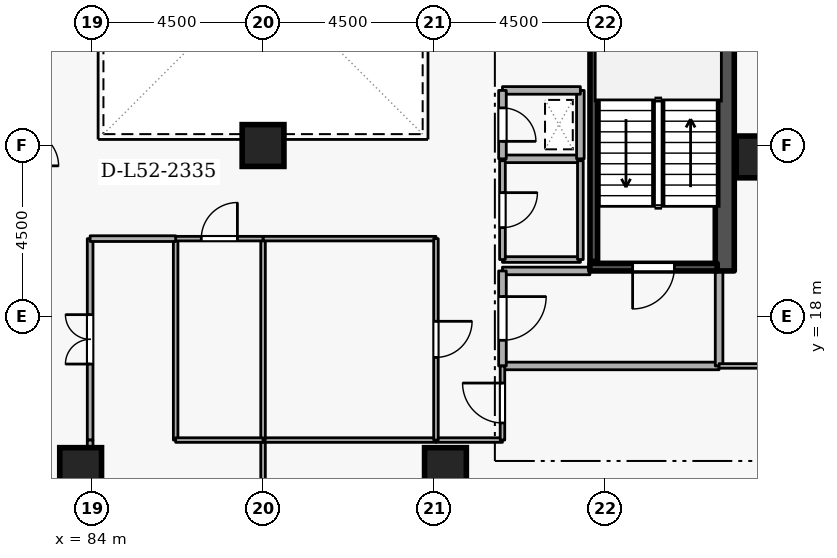
"""IFC4 building model, lengths in metres.
Left out: names, types, materials, properties, quantities, classifications, styles, units other than length and angle.
Written with IfcOpenShell. Run it as: python <this file> out.ifc"""

import sys

from ifc_helpers import new_model, si_unit, direction, frame, frame_2d, origin, origin_2d, place, context, subcontext, project, spatial, rectangle, extrude, element, fill, save


model = new_model("IFC4")
c1 = context("Model", 3, precision=1e-05, world=origin(), true_north=direction((0.0, 1.0)))
c2 = subcontext(c1, "Body", "Model", "MODEL_VIEW")
j1 = project(units=[si_unit("LENGTHUNIT", "METRE"), si_unit("PLANEANGLEUNIT", "RADIAN")], contexts=[c1])
p1 = place(None, origin())
s1 = spatial("IfcSite", under=j1, at=p1, CompositionType="ELEMENT")
p2 = place(p1, origin())
s2 = spatial("IfcBuilding", under=s1, at=p2, CompositionType="ELEMENT")
p3 = place(p2, frame((0.0, 0.0, 196.5)))
s3 = spatial("IfcBuildingStorey", under=s2, at=p3, CompositionType="ELEMENT", Elevation=196.5)
p4 = place(p3, frame((100.65, 19.2, 0.0), z_axis=(0.0, 0.0, 1.0), x_axis=(0.0, 1.0, 0.0)))
e1 = element("IfcWall", 1, at=p4, inside=s3, PredefinedType="SHEAR", context=c2, shape_type="SweptSolid", body=[
    extrude(rectangle(XDim=15.6, YDim=0.5, at=frame_2d((7.8, 0.0))), origin(), (0.0, 0.0, 1.0), 3.6),
])
for number, where, z_axis, x_axis in (
    (2, (93.3, 14.0, 0.0), (0.0, 0.0, 1.0), (1.0, 0.0, 0.0)),
    (3, (83.7, 14.0, 0.0), (0.0, 0.0, 1.0), (1.0, 0.0, 0.0)),
    (4, (101.5, 22.2, 0.0), (0.0, 0.0, 1.0), (1.0, 0.0, 0.0)),
    (5, (88.5, 22.5, 0.0), (0.0, 0.0, 1.0), (1.0, 0.0, 0.0)),
):
    element("IfcColumn", number, at=place(p3, frame(where, z_axis=z_axis, x_axis=x_axis)), inside=s3, PredefinedType="COLUMN", context=c2, shape_type="SweptSolid", body=[
        extrude(rectangle(XDim=1.1, YDim=1.1, at=origin_2d()), origin(), (0.0, 0.0, 1.0), 3.6),
    ])
p5 = place(p3, frame((100.45, 19.3, 0.0), z_axis=(0.0, 0.0, 1.0), x_axis=(-1.0, 0.0, 0.0)))
e6 = element("IfcWall", 6, at=p5, inside=s3, PredefinedType="SHEAR", context=c2, shape_type="SweptSolid", body=[
    extrude(rectangle(XDim=3.35, YDim=0.2, at=frame_2d((1.675, 0.0))), origin(), (0.0, 0.0, 1.0), 3.6),
])
p6 = place(p5, frame((1.125, 0.0, 0.0)))
e7 = element("IfcOpeningElement", 7, at=p6, cuts=e6, PredefinedType="OPENING", context=c2, shape_type="SweptSolid", body=[
    extrude(rectangle(XDim=1.1, YDim=2.1, at=frame_2d((0.55, 1.05))), frame((0.0, 0.11, 0.0), z_axis=(0.0, -1.0, 0.0), x_axis=(1.0, 0.0, 0.0)), (0.0, 0.0, 1.0), 0.22),
])
p7 = place(p3, frame((97.203, 26.55, 0.0), z_axis=(0.0, 0.0, 1.0), x_axis=(0.0, -1.0, 0.0)))
e8 = element("IfcWall", 8, at=p7, inside=s3, PredefinedType="SHEAR", context=c2, shape_type="SweptSolid", body=[
    extrude(rectangle(XDim=7.1, YDim=0.2, at=frame_2d((3.55, 0.0))), origin(), (0.0, 0.0, 1.0), 3.6),
])
p8 = place(p3, frame((94.8, 16.7, 0.0), z_axis=(0.0, 0.0, 1.0), x_axis=(1.0, 0.0, 0.0)))
e9 = element("IfcWall", 9, at=p8, inside=s3, PredefinedType="STANDARD", context=c2, shape_type="SweptSolid", body=[
    extrude(rectangle(XDim=5.7, YDim=0.2, at=frame_2d((2.85, 0.0))), origin(), (0.0, 0.0, 1.0), 3.32),
])
p9 = place(p3, frame((100.5, 16.7, 0.0), z_axis=(0.0, 0.0, 1.0), x_axis=(0.0, 1.0, 0.0)))
e10 = element("IfcWall", 10, at=p9, inside=s3, PredefinedType="STANDARD", context=c2, shape_type="SweptSolid", body=[
    extrude(rectangle(XDim=2.5, YDim=0.2, at=frame_2d((1.25, 0.0))), origin(), (0.0, 0.0, 1.0), 3.32),
])
p10 = place(p3, frame((97.1, 19.2, 0.0), z_axis=(0.0, 0.0, 1.0), x_axis=(-1.0, 0.0, 0.0)))
e11 = element("IfcWall", 11, at=p10, inside=s3, PredefinedType="STANDARD", context=c2, shape_type="SweptSolid", body=[
    extrude(rectangle(XDim=2.3, YDim=0.2, at=frame_2d((1.15, 0.0))), origin(), (0.0, 0.0, 1.0), 2.525),
])
p11 = place(p3, frame((94.8, 19.2, 0.0), z_axis=(0.0, 0.0, 1.0), x_axis=(0.0, -1.0, 0.0)))
e12 = element("IfcWall", 12, at=p11, inside=s3, PredefinedType="STANDARD", context=c2, shape_type="SweptSolid", body=[
    extrude(rectangle(XDim=2.5, YDim=0.2, at=frame_2d((1.25, 0.0))), origin(), (0.0, 0.0, 1.0), 3.32),
])
p12 = place(p11, frame((0.675, 0.0, 0.0)))
e13 = element("IfcOpeningElement", 13, at=p12, cuts=e12, PredefinedType="OPENING", context=c2, shape_type="SweptSolid", body=[
    extrude(rectangle(XDim=1.15, YDim=2.1, at=frame_2d((0.575, 1.05))), frame((0.0, 0.11, 0.0), z_axis=(0.0, -1.0, 0.0), x_axis=(1.0, 0.0, 0.0)), (0.0, 0.0, 1.0), 0.22),
])
p13 = place(p3, frame((94.8, 22.15, 0.0), z_axis=(0.0, 0.0, 1.0), x_axis=(1.0, 0.0, 0.0)))
e14 = element("IfcWall", 14, at=p13, inside=s3, PredefinedType="STANDARD", context=c2, shape_type="SweptSolid", body=[
    extrude(rectangle(XDim=2.05, YDim=0.2, at=frame_2d((1.025, 0.0))), origin(), (0.0, 0.0, 1.0), 3.32),
])
p14 = place(p3, frame((96.85, 22.15, 0.0), z_axis=(0.0, 0.0, 1.0), x_axis=(0.0, 1.0, 0.0)))
e15 = element("IfcWall", 15, at=p14, inside=s3, PredefinedType="STANDARD", context=c2, shape_type="SweptSolid", body=[
    extrude(rectangle(XDim=1.8, YDim=0.2, at=frame_2d((0.9, 0.0))), origin(), (0.0, 0.0, 1.0), 3.32),
])
p15 = place(p3, frame((96.85, 23.95, 0.0), z_axis=(0.0, 0.0, 1.0), x_axis=(-1.0, 0.0, 0.0)))
e16 = element("IfcWall", 16, at=p15, inside=s3, PredefinedType="STANDARD", context=c2, shape_type="SweptSolid", body=[
    extrude(rectangle(XDim=2.05, YDim=0.2, at=frame_2d((1.025, 0.0))), origin(), (0.0, 0.0, 1.0), 3.32),
])
p16 = place(p3, frame((94.8, 23.95, 0.0), z_axis=(0.0, 0.0, 1.0), x_axis=(0.0, -1.0, 0.0)))
e17 = element("IfcWall", 17, at=p16, inside=s3, PredefinedType="STANDARD", context=c2, shape_type="SweptSolid", body=[
    extrude(rectangle(XDim=1.8, YDim=0.2, at=frame_2d((0.9, 0.0))), origin(), (0.0, 0.0, 1.0), 3.32),
])
p17 = place(p16, frame((0.46, 0.0, 0.0)))
e18 = element("IfcOpeningElement", 18, at=p17, cuts=e17, PredefinedType="OPENING", context=c2, shape_type="SweptSolid", body=[
    extrude(rectangle(XDim=0.88, YDim=2.04, at=frame_2d((0.44, 1.02))), frame((0.0, 0.11, 0.0), z_axis=(0.0, -1.0, 0.0), x_axis=(1.0, 0.0, 0.0)), (0.0, 0.0, 1.0), 0.22),
])
p18 = place(p3, frame((94.8, 19.5, 0.0), z_axis=(0.0, 0.0, 1.0), x_axis=(1.0, 0.0, 0.0)))
e19 = element("IfcWall", 19, at=p18, inside=s3, PredefinedType="PARTITIONING", context=c2, shape_type="SweptSolid", body=[
    extrude(rectangle(XDim=2.05, YDim=0.15, at=frame_2d((1.025, 0.0))), origin(), (0.0, 0.0, 1.0), 2.525),
])
p19 = place(p3, frame((96.85, 19.5, 0.0), z_axis=(0.0, 0.0, 1.0), x_axis=(0.0, 1.0, 0.0)))
e20 = element("IfcWall", 20, at=p19, inside=s3, PredefinedType="PARTITIONING", context=c2, shape_type="SweptSolid", body=[
    extrude(rectangle(XDim=2.6, YDim=0.15, at=frame_2d((1.3, 0.0))), origin(), (0.0, 0.0, 1.0), 3.32),
])
p20 = place(p3, frame((94.8, 22.1, 0.0), z_axis=(0.0, 0.0, 1.0), x_axis=(0.0, -1.0, 0.0)))
e21 = element("IfcWall", 21, at=p20, inside=s3, PredefinedType="PARTITIONING", context=c2, shape_type="SweptSolid", body=[
    extrude(rectangle(XDim=2.6, YDim=0.15, at=frame_2d((1.3, 0.0))), origin(), (0.0, 0.0, 1.0), 3.32),
])
p21 = place(p20, frame((0.84, 0.0, 0.0)))
e22 = element("IfcOpeningElement", 22, at=p21, cuts=e21, PredefinedType="OPENING", context=c2, shape_type="SweptSolid", body=[
    extrude(rectangle(XDim=0.92, YDim=2.08, at=frame_2d((0.46, 1.04))), frame((0.0, 0.085, 0.0), z_axis=(0.0, -1.0, 0.0), x_axis=(1.0, 0.0, 0.0)), (0.0, 0.0, 1.0), 0.17),
])
p22 = place(p3, frame((88.5, 9.28, 0.0), z_axis=(0.0, 0.0, 1.0), x_axis=(0.0, 1.0, 0.0)))
e23 = element("IfcWall", 23, at=p22, inside=s3, PredefinedType="PARTITIONING", context=c2, shape_type="SweptSolid", body=[
    extrude(rectangle(XDim=5.47, YDim=0.12, at=frame_2d((2.735, 0.0))), origin(), (0.0, 0.0, 1.0), 1.785),
])
p23 = place(p3, frame((88.5, 14.75, 0.0), z_axis=(0.0, 0.0, 1.0), x_axis=(1.0, 0.0, 0.0)))
e24 = element("IfcWall", 24, at=p23, inside=s3, PredefinedType="PARTITIONING", context=c2, shape_type="SweptSolid", body=[
    extrude(rectangle(XDim=4.55, YDim=0.12, at=frame_2d((2.275, 0.0))), origin(), (0.0, 0.0, 1.0), 3.32),
])
p24 = place(p3, frame((93.05, 14.75, 0.0), z_axis=(0.0, 0.0, 1.0), x_axis=(1.0, 0.0, 0.0)))
e25 = element("IfcWall", 25, at=p24, inside=s3, PredefinedType="PARTITIONING", context=c2, shape_type="SweptSolid", body=[
    extrude(rectangle(XDim=1.75, YDim=0.12, at=frame_2d((0.875, 0.0))), origin(), (0.0, 0.0, 1.0), 3.32),
])
p25 = place(p3, frame((94.8, 14.75, 0.0), z_axis=(0.0, 0.0, 1.0), x_axis=(0.0, 1.0, 0.0)))
e26 = element("IfcWall", 26, at=p25, inside=s3, PredefinedType="PARTITIONING", context=c2, shape_type="SweptSolid", body=[
    extrude(rectangle(XDim=1.95, YDim=0.12, at=frame_2d((0.975, 0.0))), origin(), (0.0, 0.0, 1.0), 3.32),
])
p26 = place(p25, frame((0.45, 0.0, 0.0)))
e27 = element("IfcOpeningElement", 27, at=p26, cuts=e26, PredefinedType="OPENING", context=c2, shape_type="SweptSolid", body=[
    extrude(rectangle(XDim=1.05, YDim=2.1, at=frame_2d((0.525, 1.05))), frame((0.0, 0.07, 0.0), z_axis=(0.0, -1.0, 0.0), x_axis=(1.0, 0.0, 0.0)), (0.0, 0.0, 1.0), 0.14),
])
p27 = place(p3, frame((100.5, 16.7, 0.0), z_axis=(0.0, 0.0, 1.0), x_axis=(1.0, 0.0, 0.0)))
e28 = element("IfcWall", 28, at=p27, inside=s3, PredefinedType="PARTITIONING", context=c2, shape_type="SweptSolid", body=[
    extrude(rectangle(XDim=5.72, YDim=0.12, at=frame_2d((2.86, 0.0))), origin(), (0.0, 0.0, 1.0), 3.32),
])
p28 = place(p3, frame((88.5, 14.75, 0.0), z_axis=(0.0, 0.0, 1.0), x_axis=(0.0, 1.0, 0.0)))
e29 = element("IfcWall", 29, at=p28, inside=s3, PredefinedType="PARTITIONING", context=c2, shape_type="SweptSolid", body=[
    extrude(rectangle(XDim=5.3, YDim=0.12, at=frame_2d((2.65, 0.0))), origin(), (0.0, 0.0, 1.0), 1.785),
])
p29 = place(p3, frame((88.5, 20.05, 0.0), z_axis=(0.0, 0.0, 1.0), x_axis=(1.0, 0.0, 0.0)))
e30 = element("IfcWall", 30, at=p29, inside=s3, PredefinedType="PARTITIONING", context=c2, shape_type="SweptSolid", body=[
    extrude(rectangle(XDim=4.55, YDim=0.12, at=frame_2d((2.275, 0.0))), origin(), (0.0, 0.0, 1.0), 3.32),
])
p30 = place(p3, frame((93.05, 20.05, 0.0), z_axis=(0.0, 0.0, 1.0), x_axis=(0.0, -1.0, 0.0)))
e31 = element("IfcWall", 31, at=p30, inside=s3, PredefinedType="PARTITIONING", context=c2, shape_type="SweptSolid", body=[
    extrude(rectangle(XDim=5.3, YDim=0.12, at=frame_2d((2.65, 0.0))), origin(), (0.0, 0.0, 1.0), 3.32),
])
p31 = place(p30, frame((2.175, 0.0, 0.0)))
e32 = element("IfcOpeningElement", 32, at=p31, cuts=e31, PredefinedType="OPENING", context=c2, shape_type="SweptSolid", body=[
    extrude(rectangle(XDim=0.95, YDim=2.1, at=frame_2d((0.475, 1.05))), frame((0.0, 0.07, 0.0), z_axis=(0.0, -1.0, 0.0), x_axis=(1.0, 0.0, 0.0)), (0.0, 0.0, 1.0), 0.14),
])
p32 = place(p3, frame((86.2, 14.75, 0.0), z_axis=(0.0, 0.0, 1.0), x_axis=(0.0, 1.0, 0.0)))
e33 = element("IfcWall", 33, at=p32, inside=s3, PredefinedType="PARTITIONING", context=c2, shape_type="SweptSolid", body=[
    extrude(rectangle(XDim=5.3, YDim=0.12, at=frame_2d((2.65, 0.0))), origin(), (0.0, 0.0, 1.0), 3.32),
])
p33 = place(p3, frame((86.2, 20.05, 0.0), z_axis=(0.0, 0.0, 1.0), x_axis=(1.0, 0.0, 0.0)))
e34 = element("IfcWall", 34, at=p33, inside=s3, PredefinedType="PARTITIONING", context=c2, shape_type="SweptSolid", body=[
    extrude(rectangle(XDim=2.3, YDim=0.12, at=frame_2d((1.15, 0.0))), origin(), (0.0, 0.0, 1.0), 3.32),
])
p34 = place(p33, frame((0.675, 0.0, 0.0)))
e35 = element("IfcOpeningElement", 35, at=p34, cuts=e34, PredefinedType="OPENING", context=c2, shape_type="SweptSolid", body=[
    extrude(rectangle(XDim=0.95, YDim=2.1, at=frame_2d((0.475, 1.05))), frame((0.0, 0.07, 0.0), z_axis=(0.0, -1.0, 0.0), x_axis=(1.0, 0.0, 0.0)), (0.0, 0.0, 1.0), 0.14),
])
p35 = place(p3, frame((88.5, 14.75, 0.0), z_axis=(0.0, 0.0, 1.0), x_axis=(-1.0, 0.0, 0.0)))
e36 = element("IfcWall", 36, at=p35, inside=s3, PredefinedType="PARTITIONING", context=c2, shape_type="SweptSolid", body=[
    extrude(rectangle(XDim=2.3, YDim=0.12, at=frame_2d((1.15, 0.0))), origin(), (0.0, 0.0, 1.0), 3.32),
])
p36 = place(p3, frame((83.95, 14.75, 0.0), z_axis=(0.0, 0.0, 1.0), x_axis=(0.0, 1.0, 0.0)))
e37 = element("IfcWall", 37, at=p36, inside=s3, PredefinedType="PARTITIONING", context=c2, shape_type="SweptSolid", body=[
    extrude(rectangle(XDim=5.3, YDim=0.15, at=frame_2d((2.65, 0.0))), origin(), (0.0, 0.0, 1.0), 3.32),
])
p37 = place(p36, frame((2.0, 0.0, 0.0)))
e38 = element("IfcOpeningElement", 38, at=p37, cuts=e37, PredefinedType="OPENING", context=c2, shape_type="SweptSolid", body=[
    extrude(rectangle(XDim=1.3, YDim=2.12, at=frame_2d((0.65, 1.06))), frame((0.0, 0.085, 0.0), z_axis=(0.0, -1.0, 0.0), x_axis=(1.0, 0.0, 0.0)), (0.0, 0.0, 1.0), 0.17),
])
p38 = place(p3, frame((83.95, 20.05, 0.0), z_axis=(0.0, 0.0, 1.0), x_axis=(1.0, 0.0, 0.0)))
e39 = element("IfcWall", 39, at=p38, inside=s3, PredefinedType="PARTITIONING", context=c2, shape_type="SweptSolid", body=[
    extrude(rectangle(XDim=2.25, YDim=0.15, at=frame_2d((1.125, 0.0))), origin(), (0.0, 0.0, 1.0), 3.32),
])
p39 = place(p3, frame((83.95, 12.4, 0.0), z_axis=(0.0, 0.0, 1.0), x_axis=(0.0, 1.0, 0.0)))
e40 = element("IfcWall", 40, at=p39, inside=s3, PredefinedType="PARTITIONING", context=c2, shape_type="SweptSolid", body=[
    extrude(rectangle(XDim=2.35, YDim=0.15, at=frame_2d((1.175, 0.0))), origin(), (0.0, 0.0, 1.0), 3.32),
])
p40 = place(p6, origin())
e41 = element("IfcDoor", 41, at=p40, inside=s3, OperationType="SINGLE_SWING_RIGHT", PredefinedType="DOOR", context=c2, shape_type="SweptSolid", body=[
    extrude(rectangle(XDim=1.1, YDim=2.1, at=frame_2d((0.55, 1.05))), frame((0.0, 0.025, 0.0), z_axis=(0.0, -1.0, 0.0), x_axis=(1.0, 0.0, 0.0)), (0.0, 0.0, 1.0), 0.05),
])
fill(e7, e41)
p41 = place(p12, origin())
e42 = element("IfcDoor", 42, at=p41, inside=s3, OperationType="SINGLE_SWING_LEFT", PredefinedType="DOOR", context=c2, shape_type="SweptSolid", body=[
    extrude(rectangle(XDim=1.15, YDim=2.1, at=frame_2d((0.575, 1.05))), frame((0.0, 0.025, 0.0), z_axis=(0.0, -1.0, 0.0), x_axis=(1.0, 0.0, 0.0)), (0.0, 0.0, 1.0), 0.05),
])
fill(e13, e42)
p42 = place(p17, origin())
e43 = element("IfcDoor", 43, at=p42, inside=s3, OperationType="SINGLE_SWING_RIGHT", PredefinedType="DOOR", context=c2, shape_type="SweptSolid", body=[
    extrude(rectangle(XDim=0.88, YDim=2.04, at=frame_2d((0.44, 1.02))), frame((0.0, 0.025, 0.0), z_axis=(0.0, -1.0, 0.0), x_axis=(1.0, 0.0, 0.0)), (0.0, 0.0, 1.0), 0.05),
])
fill(e18, e43)
p43 = place(p21, origin())
e44 = element("IfcDoor", 44, at=p43, inside=s3, OperationType="SINGLE_SWING_LEFT", PredefinedType="DOOR", context=c2, shape_type="SweptSolid", body=[
    extrude(rectangle(XDim=0.92, YDim=2.08, at=frame_2d((0.46, 1.04))), frame((0.0, 0.025, 0.0), z_axis=(0.0, -1.0, 0.0), x_axis=(1.0, 0.0, 0.0)), (0.0, 0.0, 1.0), 0.05),
])
fill(e22, e44)
p44 = place(p26, origin())
e45 = element("IfcDoor", 45, at=p44, inside=s3, OperationType="SINGLE_SWING_RIGHT", PredefinedType="DOOR", context=c2, shape_type="SweptSolid", body=[
    extrude(rectangle(XDim=1.05, YDim=2.1, at=frame_2d((0.525, 1.05))), frame((0.0, 0.025, 0.0), z_axis=(0.0, -1.0, 0.0), x_axis=(1.0, 0.0, 0.0)), (0.0, 0.0, 1.0), 0.05),
])
fill(e27, e45)
p45 = place(p31, origin())
e46 = element("IfcDoor", 46, at=p45, inside=s3, OperationType="SINGLE_SWING_LEFT", PredefinedType="DOOR", context=c2, shape_type="SweptSolid", body=[
    extrude(rectangle(XDim=0.95, YDim=2.1, at=frame_2d((0.475, 1.05))), frame((0.0, 0.025, 0.0), z_axis=(0.0, -1.0, 0.0), x_axis=(1.0, 0.0, 0.0)), (0.0, 0.0, 1.0), 0.05),
])
fill(e32, e46)
p46 = place(p34, origin())
e47 = element("IfcDoor", 47, at=p46, inside=s3, OperationType="SINGLE_SWING_RIGHT", PredefinedType="DOOR", context=c2, shape_type="SweptSolid", body=[
    extrude(rectangle(XDim=0.95, YDim=2.1, at=frame_2d((0.475, 1.05))), frame((0.0, 0.025, 0.0), z_axis=(0.0, -1.0, 0.0), x_axis=(1.0, 0.0, 0.0)), (0.0, 0.0, 1.0), 0.05),
])
fill(e35, e47)
p47 = place(p37, origin())
e48 = element("IfcDoor", 48, at=p47, inside=s3, OperationType="DOUBLE_DOOR_SINGLE_SWING", PredefinedType="DOOR", context=c2, shape_type="SweptSolid", body=[
    extrude(rectangle(XDim=1.3, YDim=2.12, at=frame_2d((0.65, 1.06))), frame((0.0, 0.025, 0.0), z_axis=(0.0, -1.0, 0.0), x_axis=(1.0, 0.0, 0.0)), (0.0, 0.0, 1.0), 0.05),
])
fill(e38, e48)
save(model, sys.argv[1])
